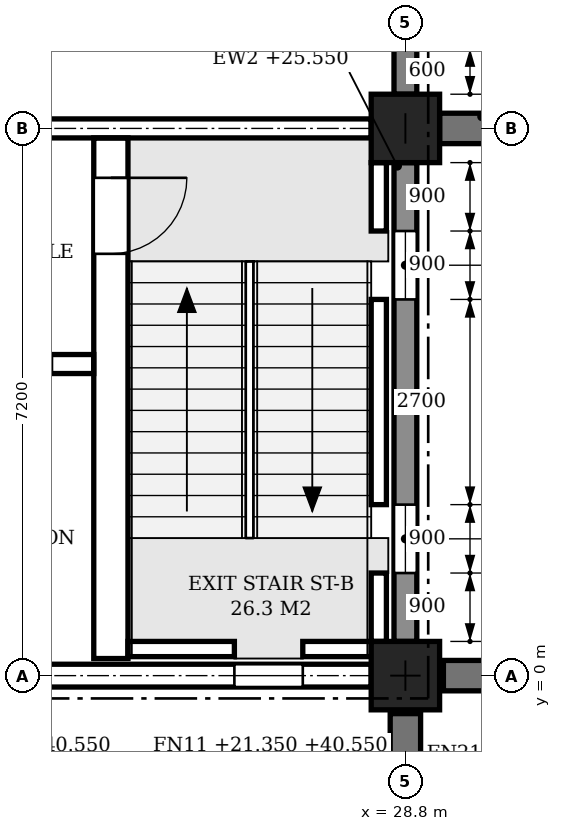
"""IFC4 building model, lengths in metres.
Left out: names, types, materials, properties, quantities, classifications, styles, units other than length and angle.
Written with IfcOpenShell. Run it as: python <this file> out.ifc"""

import sys

from ifc_helpers import new_model, si_unit, direction, frame, frame_2d, origin, origin_2d, place, context, subcontext, project, spatial, polyline, rectangle, outline, extrude, element, fill, save


model = new_model("IFC4")
c1 = context("Model", 3, precision=1e-05, world=origin(), true_north=direction((0.0, 1.0)))
c2 = subcontext(c1, "Body", "Model", "MODEL_VIEW")
j1 = project(units=[si_unit("LENGTHUNIT", "METRE"), si_unit("PLANEANGLEUNIT", "RADIAN")], contexts=[c1])
p1 = place(None, origin())
s1 = spatial("IfcSite", under=j1, at=p1, CompositionType="ELEMENT")
p2 = place(p1, origin())
s2 = spatial("IfcBuilding", under=s1, at=p2, CompositionType="ELEMENT")
p3 = place(p2, frame((0.0, 0.0, 21.6)))
s3 = spatial("IfcBuildingStorey", under=s2, at=p3, CompositionType="ELEMENT", Elevation=21.6)
for number, where, z_axis, x_axis in (
    (1, (28.8, 0.0, 0.0), (0.0, 0.0, 1.0), (1.0, 0.0, 0.0)),
    (2, (28.8, 7.2, 0.0), (0.0, 0.0, 1.0), (1.0, 0.0, 0.0)),
):
    element("IfcColumn", number, at=place(p3, frame(where, z_axis=z_axis, x_axis=x_axis)), inside=s3, PredefinedType="COLUMN", context=c2, shape_type="SweptSolid", body=[
        extrude(rectangle(XDim=0.9, YDim=0.9, at=origin_2d()), origin(), (0.0, 0.0, 1.0), 4.8),
    ])
p4 = place(p3, frame((22.05, 0.0, 0.0), z_axis=(0.0, 0.0, 1.0), x_axis=(1.0, 0.0, 0.0)))
e3 = element("IfcWall", 3, at=p4, inside=s3, PredefinedType="STANDARD", context=c2, shape_type="SweptSolid", body=[
    extrude(rectangle(XDim=6.3, YDim=0.3, at=frame_2d((3.15, 0.0))), origin(), (0.0, 0.0, 1.0), 3.95),
])
p5 = place(p4, frame((4.5, 0.0, 0.9)))
e4 = element("IfcOpeningElement", 4, at=p5, cuts=e3, PredefinedType="OPENING", context=c2, shape_type="SweptSolid", body=[
    extrude(outline(polyline([(0.0, 0.0), (0.9, 0.0), (0.9, 2.05), (0.45, 2.5), (0.0, 2.05), (0.0, 0.0)])), frame((0.0, 0.16, 0.0), z_axis=(0.0, -1.0, 0.0), x_axis=(1.0, 0.0, 0.0)), (0.0, 0.0, 1.0), 0.32),
])
p6 = place(p3, frame((28.8, 0.45, 0.0), z_axis=(0.0, 0.0, 1.0), x_axis=(0.0, 1.0, 0.0)))
e5 = element("IfcWall", 5, at=p6, inside=s3, PredefinedType="STANDARD", context=c2, shape_type="SweptSolid", body=[
    extrude(rectangle(XDim=6.3, YDim=0.3, at=frame_2d((3.15, 0.0))), origin(), (0.0, 0.0, 1.0), 3.95),
])
p7 = place(p6, frame((0.9, 0.0, 0.9)))
e6 = element("IfcOpeningElement", 6, at=p7, cuts=e5, PredefinedType="OPENING", context=c2, shape_type="SweptSolid", body=[
    extrude(outline(polyline([(0.0, 0.0), (0.9, 0.0), (0.9, 2.05), (0.45, 2.5), (0.0, 2.05), (0.0, 0.0)])), frame((0.0, 0.16, 0.0), z_axis=(0.0, -1.0, 0.0), x_axis=(1.0, 0.0, 0.0)), (0.0, 0.0, 1.0), 0.32),
])
p8 = place(p6, frame((4.5, 0.0, 0.9)))
e7 = element("IfcOpeningElement", 7, at=p8, cuts=e5, PredefinedType="OPENING", context=c2, shape_type="SweptSolid", body=[
    extrude(outline(polyline([(0.0, 0.0), (0.9, 0.0), (0.9, 2.05), (0.45, 2.5), (0.0, 2.05), (0.0, 0.0)])), frame((0.0, 0.16, 0.0), z_axis=(0.0, -1.0, 0.0), x_axis=(1.0, 0.0, 0.0)), (0.0, 0.0, 1.0), 0.32),
])
p9 = place(p3, frame((28.8, 7.65, 0.0), z_axis=(0.0, 0.0, 1.0), x_axis=(0.0, 1.0, 0.0)))
e8 = element("IfcWall", 8, at=p9, inside=s3, PredefinedType="STANDARD", context=c2, shape_type="SweptSolid", body=[
    extrude(rectangle(XDim=6.3, YDim=0.3, at=frame_2d((3.15, 0.0))), origin(), (0.0, 0.0, 1.0), 3.95),
])
p10 = place(p9, frame((0.6, 0.0, 0.9)))
e9 = element("IfcOpeningElement", 9, at=p10, cuts=e8, PredefinedType="OPENING", context=c2, shape_type="SweptSolid", body=[
    extrude(outline(polyline([(0.0, 0.0), (1.5, 0.0), (1.5, 1.75), (0.75, 2.5), (0.0, 1.75), (0.0, 0.0)])), frame((0.0, 0.16, 0.0), z_axis=(0.0, -1.0, 0.0), x_axis=(1.0, 0.0, 0.0)), (0.0, 0.0, 1.0), 0.32),
])
p11 = place(p3, frame((28.8, -0.5, -0.25), z_axis=(0.0, 0.0, 1.0), x_axis=(0.0, -1.0, 0.0)))
e10 = element("IfcWall", 10, at=p11, inside=s3, PredefinedType="POLYGONAL", context=c2, shape_type="SweptSolid", body=[
    extrude(outline(polyline([(0.85, 0.0), (0.85, 18.9), (0.65, 19.2), (0.0, 19.2), (0.0, 0.0), (0.85, 0.0)])), frame((0.0, 0.2, 0.0), z_axis=(0.0, -1.0, 0.0), x_axis=(1.0, 0.0, 0.0)), (0.0, 0.0, 1.0), 0.4),
])
for number, where, z_axis, x_axis in (
    (11, (29.3, 0.0, -0.25), (0.0, 0.0, 1.0), (1.0, 0.0, 0.0)),
    (12, (29.25, 7.2, -0.25), (0.0, 0.0, 1.0), (1.0, 0.0, 0.0)),
):
    element("IfcWall", number, at=place(p3, frame(where, z_axis=z_axis, x_axis=x_axis)), inside=s3, PredefinedType="POLYGONAL", context=c2, shape_type="SweptSolid", body=[
        extrude(outline(polyline([(0.6, 0.0), (0.6, 19.125), (0.55, 19.2), (0.0, 19.2), (0.0, 0.0), (0.6, 0.0)])), frame((0.0, 0.2, 0.0), z_axis=(0.0, -1.0, 0.0), x_axis=(1.0, 0.0, 0.0)), (0.0, 0.0, 1.0), 0.4),
    ])
p12 = place(p3, frame((22.05, 7.2, 0.0), z_axis=(0.0, 0.0, 1.0), x_axis=(1.0, 0.0, 0.0)))
e13 = element("IfcWall", 13, at=p12, inside=s3, PredefinedType="SHEAR", context=c2, shape_type="SweptSolid", body=[
    extrude(rectangle(XDim=6.3, YDim=0.25, at=frame_2d((3.15, 0.0))), origin(), (0.0, 0.0, 1.0), 3.8),
])
p13 = place(p12, frame((0.4, 0.0, 0.0)))
e14 = element("IfcOpeningElement", 14, at=p13, cuts=e13, PredefinedType="OPENING", context=c2, shape_type="SweptSolid", body=[
    extrude(rectangle(XDim=1.1, YDim=2.1, at=frame_2d((0.55, 1.05))), frame((0.0, 0.135, 0.0), z_axis=(0.0, -1.0, 0.0), x_axis=(1.0, 0.0, 0.0)), (0.0, 0.0, 1.0), 0.27),
])
p14 = place(p3, frame((28.45, 0.45, -0.25), z_axis=(0.0, 0.0, 1.0), x_axis=(0.0, 1.0, 0.0)))
e15 = element("IfcWall", 15, at=p14, inside=s3, PredefinedType="SHEAR", context=c2, shape_type="SweptSolid", body=[
    extrude(rectangle(XDim=0.9, YDim=0.2, at=frame_2d((0.45, 0.0))), origin(), (0.0, 0.0, 1.0), 4.8),
])
p15 = place(p3, frame((28.45, 2.25, -0.25), z_axis=(0.0, 0.0, 1.0), x_axis=(0.0, 1.0, 0.0)))
e16 = element("IfcWall", 16, at=p15, inside=s3, PredefinedType="SHEAR", context=c2, shape_type="SweptSolid", body=[
    extrude(rectangle(XDim=2.7, YDim=0.2, at=frame_2d((1.35, 0.0))), origin(), (0.0, 0.0, 1.0), 4.8),
])
p16 = place(p3, frame((28.45, 5.85, -0.25), z_axis=(0.0, 0.0, 1.0), x_axis=(0.0, 1.0, 0.0)))
e17 = element("IfcWall", 17, at=p16, inside=s3, PredefinedType="SHEAR", context=c2, shape_type="SweptSolid", body=[
    extrude(rectangle(XDim=0.9, YDim=0.2, at=frame_2d((0.45, 0.0))), origin(), (0.0, 0.0, 1.0), 4.8),
])
p17 = place(p3, frame((25.15, 0.35, -0.25), z_axis=(0.0, 0.0, 1.0), x_axis=(1.0, 0.0, 0.0)))
e18 = element("IfcWall", 18, at=p17, inside=s3, PredefinedType="SHEAR", context=c2, shape_type="SweptSolid", body=[
    extrude(rectangle(XDim=1.4, YDim=0.2, at=frame_2d((0.7, 0.0))), origin(), (0.0, 0.0, 1.0), 4.8),
])
p18 = place(p3, frame((27.45, 0.35, -0.25), z_axis=(0.0, 0.0, 1.0), x_axis=(1.0, 0.0, 0.0)))
e19 = element("IfcWall", 19, at=p18, inside=s3, PredefinedType="SHEAR", context=c2, shape_type="SweptSolid", body=[
    extrude(rectangle(XDim=0.9, YDim=0.2, at=frame_2d((0.45, 0.0))), origin(), (0.0, 0.0, 1.0), 4.8),
])
p19 = place(p3, frame((24.925, 0.225, 0.0), z_axis=(0.0, 0.0, 1.0), x_axis=(0.0, 1.0, 0.0)))
e20 = element("IfcWall", 20, at=p19, inside=s3, PredefinedType="SHEAR", context=c2, shape_type="SweptSolid", body=[
    extrude(rectangle(XDim=6.85, YDim=0.45, at=frame_2d((3.425, 0.0))), origin(), (0.0, 0.0, 1.0), 4.55),
])
p20 = place(p19, frame((5.325, 0.0, 0.0)))
e21 = element("IfcOpeningElement", 21, at=p20, cuts=e20, PredefinedType="OPENING", context=c2, shape_type="SweptSolid", body=[
    extrude(rectangle(XDim=1.0, YDim=2.1, at=frame_2d((0.5, 1.05))), frame((0.0, 0.235, 0.0), z_axis=(0.0, -1.0, 0.0), x_axis=(1.0, 0.0, 0.0)), (0.0, 0.0, 1.0), 0.47),
])
p21 = place(p3, frame((21.725, 4.1, 0.0), z_axis=(0.0, 0.0, 1.0), x_axis=(1.0, 0.0, 0.0)))
e22 = element("IfcWall", 22, at=p21, inside=s3, PredefinedType="SHEAR", context=c2, shape_type="SweptSolid", body=[
    extrude(rectangle(XDim=2.975, YDim=0.25, at=frame_2d((1.487, 0.0))), origin(), (0.0, 0.0, 1.0), 4.55),
])
p22 = place(p21, frame((1.525, 0.0, 0.0)))
e23 = element("IfcOpeningElement", 23, at=p22, cuts=e22, PredefinedType="OPENING", context=c2, shape_type="SweptSolid", body=[
    extrude(rectangle(XDim=0.9, YDim=2.1, at=frame_2d((0.45, 1.05))), frame((0.0, 0.135, 0.0), z_axis=(0.0, -1.0, 0.0), x_axis=(1.0, 0.0, 0.0)), (0.0, 0.0, 1.0), 0.27),
])
p23 = place(p7, origin())
e24 = element("IfcWindow", 24, at=p23, inside=s3, PartitioningType="SINGLE_PANEL", PredefinedType="WINDOW", context=c2, shape_type="SweptSolid", body=[
    extrude(outline(polyline([(0.0, 0.0), (0.9, 0.0), (0.9, 2.05), (0.45, 2.5), (0.0, 2.05), (0.0, 0.0)])), frame((0.0, 0.03, 0.0), z_axis=(0.0, -1.0, 0.0), x_axis=(1.0, 0.0, 0.0)), (0.0, 0.0, 1.0), 0.06),
])
fill(e6, e24)
p24 = place(p8, origin())
e25 = element("IfcWindow", 25, at=p24, inside=s3, PartitioningType="SINGLE_PANEL", PredefinedType="WINDOW", context=c2, shape_type="SweptSolid", body=[
    extrude(outline(polyline([(0.0, 0.0), (0.9, 0.0), (0.9, 2.05), (0.45, 2.5), (0.0, 2.05), (0.0, 0.0)])), frame((0.0, 0.03, 0.0), z_axis=(0.0, -1.0, 0.0), x_axis=(1.0, 0.0, 0.0)), (0.0, 0.0, 1.0), 0.06),
])
fill(e7, e25)
p25 = place(p5, origin())
e26 = element("IfcWindow", 26, at=p25, inside=s3, PartitioningType="SINGLE_PANEL", PredefinedType="WINDOW", context=c2, shape_type="SweptSolid", body=[
    extrude(outline(polyline([(0.0, 0.0), (0.9, 0.0), (0.9, 2.05), (0.45, 2.5), (0.0, 2.05), (0.0, 0.0)])), frame((0.0, 0.03, 0.0), z_axis=(0.0, -1.0, 0.0), x_axis=(1.0, 0.0, 0.0)), (0.0, 0.0, 1.0), 0.06),
])
fill(e4, e26)
p26 = place(p20, frame((1.0, 0.0, 0.0), z_axis=(0.0, 0.0, 1.0), x_axis=(-1.0, 0.0, 0.0)))
e27 = element("IfcDoor", 27, at=p26, inside=s3, OperationType="SINGLE_SWING_LEFT", PredefinedType="DOOR", context=c2, shape_type="SweptSolid", body=[
    extrude(rectangle(XDim=1.0, YDim=2.1, at=frame_2d((0.5, 1.05))), frame((0.0, 0.025, 0.0), z_axis=(0.0, -1.0, 0.0), x_axis=(1.0, 0.0, 0.0)), (0.0, 0.0, 1.0), 0.05),
])
fill(e21, e27)
save(model, sys.argv[1])
